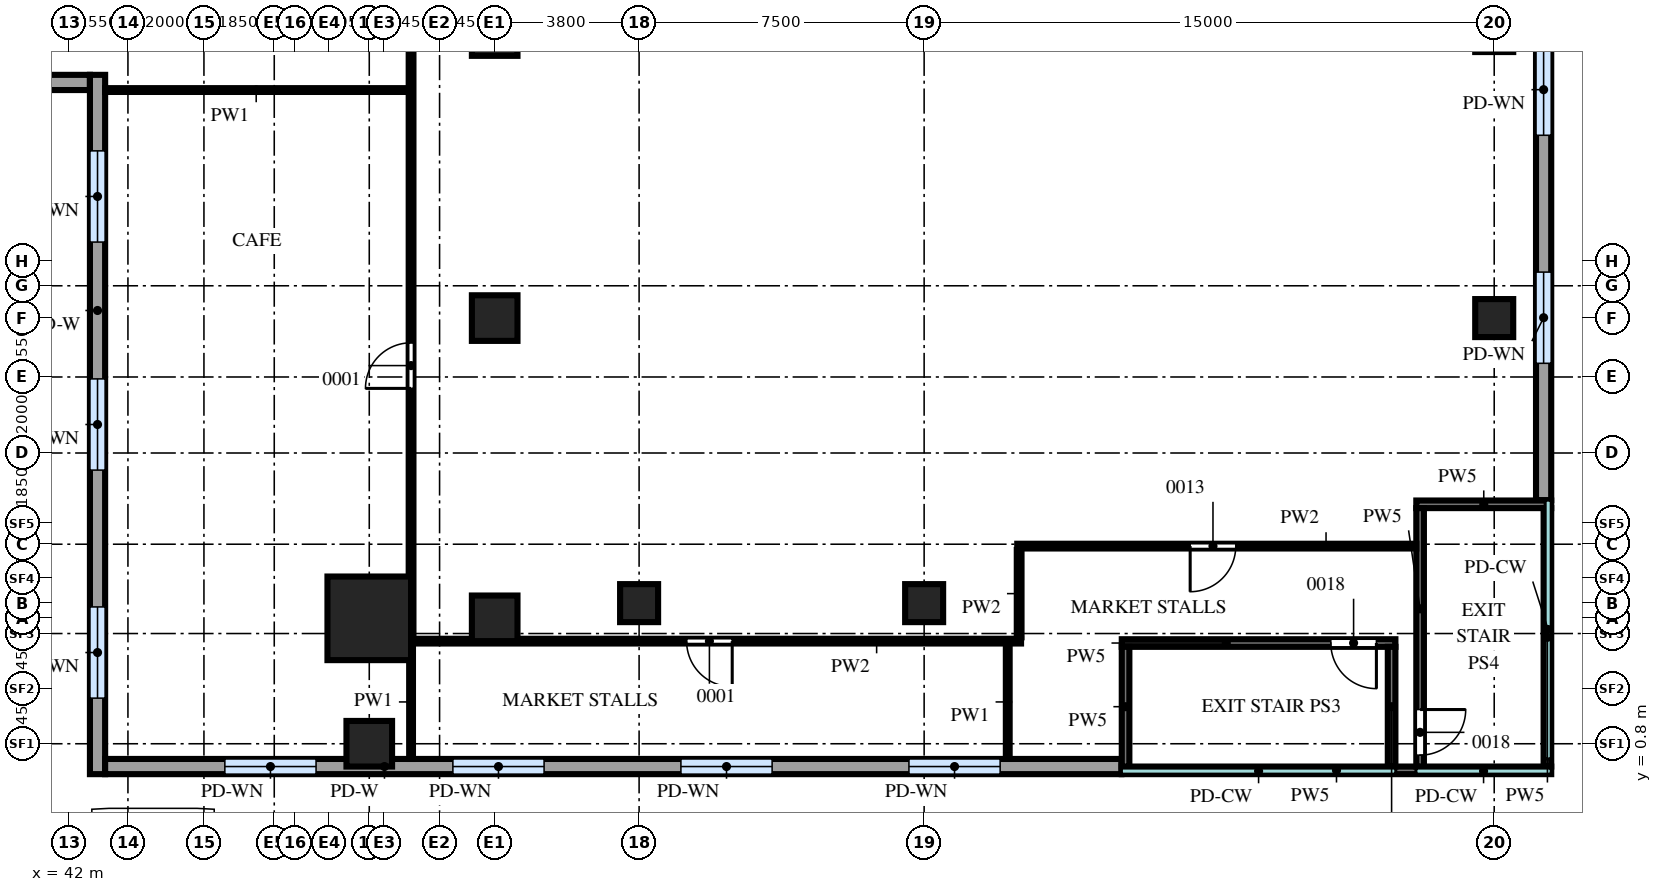
"""IFC4 building model, lengths in metres.
Left out: names, types, materials, properties, quantities, classifications, styles, units other than length and angle.
Written with IfcOpenShell. Run it as: python <this file> out.ifc"""

import sys

from ifc_helpers import new_model, si_unit, direction, frame, frame_2d, origin, origin_2d, place, context, subcontext, project, spatial, rectangle, extrude, source, transform, mapped, element, fill, save


model = new_model("IFC4")
c1 = context("Model", 3, precision=1e-05, world=origin(), true_north=direction((0.0, 1.0)))
c2 = subcontext(c1, "Body", "Model", "MODEL_VIEW")
j1 = project(units=[si_unit("LENGTHUNIT", "METRE"), si_unit("PLANEANGLEUNIT", "RADIAN")], contexts=[c1])
p1 = place(None, origin())
s1 = spatial("IfcSite", under=j1, at=p1, CompositionType="ELEMENT")
p2 = place(p1, origin())
s2 = spatial("IfcBuilding", under=s1, at=p2, CompositionType="ELEMENT")
p3 = place(p2, frame((0.0, 0.0, 7.5)))
s3 = spatial("IfcBuildingStorey", under=s2, at=p3, CompositionType="ELEMENT", Elevation=7.5)
m1 = source(origin(), c2, "Body", "SweptSolid", [
    extrude(rectangle(XDim=2.2, YDim=2.2, at=origin_2d()), origin(), (0.0, 0.0, 1.0), 5.2),
])
p4 = place(p3, frame((49.9, 4.1, 0.0), z_axis=(0.0, 0.0, 1.0), x_axis=(1.0, 0.0, 0.0)))
e1 = element("IfcColumn", 1, at=p4, inside=s3, PredefinedType="COLUMN", context=c2, shape_type="MappedRepresentation", body=[
    mapped(m1, transform((0.0, 0.0, 0.0))),
])
m2 = source(origin(), c2, "Body", "SweptSolid", [
    extrude(rectangle(XDim=1.2, YDim=1.2, at=origin_2d()), origin(), (0.0, 0.0, 1.0), 5.2),
])
for number, where, z_axis, x_axis in (
    (2, (49.9, 0.8, 0.0), (0.0, 0.0, 1.0), (1.0, 0.0, 0.0)),
    (3, (53.2, 4.1, 0.0), (0.0, 0.0, 1.0), (1.0, 0.0, 0.0)),
    (4, (53.2, 12.0, 0.0), (0.0, 0.0, 1.0), (1.0, 0.0, 0.0)),
    (5, (53.2, 19.5, 0.0), (0.0, 0.0, 1.0), (1.0, 0.0, 0.0)),
):
    element("IfcColumn", number, at=place(p3, frame(where, z_axis=z_axis, x_axis=x_axis)), inside=s3, PredefinedType="COLUMN", context=c2, shape_type="MappedRepresentation", body=[
        mapped(m2, transform((0.0, 0.0, 0.0))),
    ])
m3 = source(origin(), c2, "Body", "SweptSolid", [
    extrude(rectangle(XDim=1.0, YDim=1.0, at=origin_2d()), origin(), (0.0, 0.0, 1.0), 5.2),
])
for number, where, z_axis, x_axis in (
    (6, (57.0, 4.5, 0.0), (0.0, 0.0, 1.0), (1.0, 0.0, 0.0)),
    (7, (64.5, 4.5, 0.0), (0.0, 0.0, 1.0), (1.0, 0.0, 0.0)),
    (8, (79.5, 12.0, 0.0), (0.0, 0.0, 1.0), (1.0, 0.0, 0.0)),
):
    element("IfcColumn", number, at=place(p3, frame(where, z_axis=z_axis, x_axis=x_axis)), inside=s3, PredefinedType="COLUMN", context=c2, shape_type="MappedRepresentation", body=[
        mapped(m3, transform((0.0, 0.0, 0.0))),
    ])
m4 = source(origin(), c2, "Body", "SweptSolid", [
    extrude(rectangle(XDim=13.5, YDim=0.4, at=frame_2d((6.75, 0.0))), origin(), (0.0, 0.0, 1.0), 5.2),
])
p5 = place(p3, frame((29.05, 18.2, 0.0), z_axis=(0.0, 0.0, 1.0), x_axis=(1.0, 0.0, 0.0)))
e9 = element("IfcWall", 9, at=p5, inside=s3, PredefinedType="SOLIDWALL", context=c2, shape_type="MappedRepresentation", body=[
    mapped(m4, transform((0.0, 0.0, 0.0))),
])
m5 = source(origin(), c2, "Body", "SweptSolid", [
    extrude(rectangle(XDim=2.4, YDim=2.4, at=frame_2d((1.2, 1.2))), frame((0.0, 0.21, 0.0), z_axis=(0.0, -1.0, 0.0), x_axis=(1.0, 0.0, 0.0)), (0.0, 0.0, 1.0), 0.42),
])
p6 = place(p5, frame((2.55, 0.0, 1.0)))
e10 = element("IfcOpeningElement", 10, at=p6, cuts=e9, PredefinedType="OPENING", context=c2, shape_type="MappedRepresentation", body=[
    mapped(m5, transform((0.0, 0.0, 0.0))),
])
p7 = place(p5, frame((8.55, 0.0, 1.0)))
e11 = element("IfcOpeningElement", 11, at=p7, cuts=e9, PredefinedType="OPENING", context=c2, shape_type="MappedRepresentation", body=[
    mapped(m5, transform((0.0, 0.0, 0.0))),
])
m6 = source(origin(), c2, "Body", "SweptSolid", [
    extrude(rectangle(XDim=18.4, YDim=0.4, at=frame_2d((9.2, 0.0))), origin(), (0.0, 0.0, 1.0), 5.2),
])
p8 = place(p3, frame((42.75, 18.4, 0.0), z_axis=(0.0, 0.0, 1.0), x_axis=(0.0, -1.0, 0.0)))
e12 = element("IfcWall", 12, at=p8, inside=s3, PredefinedType="SOLIDWALL", context=c2, shape_type="MappedRepresentation", body=[
    mapped(m6, transform((0.0, 0.0, 0.0))),
])
p9 = place(p8, frame((2.0, 0.0, 1.0)))
e13 = element("IfcOpeningElement", 13, at=p9, cuts=e12, PredefinedType="OPENING", context=c2, shape_type="MappedRepresentation", body=[
    mapped(m5, transform((0.0, 0.0, 0.0))),
])
p10 = place(p8, frame((8.0, 0.0, 1.0)))
e14 = element("IfcOpeningElement", 14, at=p10, cuts=e12, PredefinedType="OPENING", context=c2, shape_type="MappedRepresentation", body=[
    mapped(m5, transform((0.0, 0.0, 0.0))),
])
p11 = place(p8, frame((14.0, 0.0, 1.0)))
e15 = element("IfcOpeningElement", 15, at=p11, cuts=e12, PredefinedType="OPENING", context=c2, shape_type="MappedRepresentation", body=[
    mapped(m5, transform((0.0, 0.0, 0.0))),
])
m7 = source(origin(), c2, "Body", "SweptSolid", [
    extrude(rectangle(XDim=26.74, YDim=0.4, at=frame_2d((13.37, 0.0))), origin(), (0.0, 0.0, 1.0), 5.2),
])
p12 = place(p3, frame((42.95, 0.2, 0.0), z_axis=(0.0, 0.0, 1.0), x_axis=(1.0, 0.0, 0.0)))
e16 = element("IfcWall", 16, at=p12, inside=s3, PredefinedType="SOLIDWALL", context=c2, shape_type="MappedRepresentation", body=[
    mapped(m7, transform((0.0, 0.0, 0.0))),
])
p13 = place(p12, frame((3.15, 0.0, 1.0)))
e17 = element("IfcOpeningElement", 17, at=p13, cuts=e16, PredefinedType="OPENING", context=c2, shape_type="MappedRepresentation", body=[
    mapped(m5, transform((0.0, 0.0, 0.0))),
])
p14 = place(p12, frame((9.15, 0.0, 1.0)))
e18 = element("IfcOpeningElement", 18, at=p14, cuts=e16, PredefinedType="OPENING", context=c2, shape_type="MappedRepresentation", body=[
    mapped(m5, transform((0.0, 0.0, 0.0))),
])
p15 = place(p12, frame((15.15, 0.0, 1.0)))
e19 = element("IfcOpeningElement", 19, at=p15, cuts=e16, PredefinedType="OPENING", context=c2, shape_type="MappedRepresentation", body=[
    mapped(m5, transform((0.0, 0.0, 0.0))),
])
p16 = place(p12, frame((21.15, 0.0, 1.0)))
e20 = element("IfcOpeningElement", 20, at=p16, cuts=e16, PredefinedType="OPENING", context=c2, shape_type="MappedRepresentation", body=[
    mapped(m5, transform((0.0, 0.0, 0.0))),
])
m8 = source(origin(), c2, "Body", "SweptSolid", [
    extrude(rectangle(XDim=39.58, YDim=0.4, at=frame_2d((19.79, 0.0))), origin(), (0.0, 0.0, 1.0), 5.2),
])
p17 = place(p3, frame((80.8, 7.21, 0.0), z_axis=(0.0, 0.0, 1.0), x_axis=(0.0, 1.0, 0.0)))
e21 = element("IfcWall", 21, at=p17, inside=s3, PredefinedType="SOLIDWALL", context=c2, shape_type="MappedRepresentation", body=[
    mapped(m8, transform((0.0, 0.0, 0.0))),
])
p18 = place(p17, frame((3.6, 0.0, 1.0)))
e22 = element("IfcOpeningElement", 22, at=p18, cuts=e21, PredefinedType="OPENING", context=c2, shape_type="MappedRepresentation", body=[
    mapped(m5, transform((0.0, 0.0, 0.0))),
])
p19 = place(p17, frame((9.6, 0.0, 1.0)))
e23 = element("IfcOpeningElement", 23, at=p19, cuts=e21, PredefinedType="OPENING", context=c2, shape_type="MappedRepresentation", body=[
    mapped(m5, transform((0.0, 0.0, 0.0))),
])
p20 = place(p17, frame((15.6, 0.0, 1.0)))
e24 = element("IfcOpeningElement", 24, at=p20, cuts=e21, PredefinedType="OPENING", context=c2, shape_type="MappedRepresentation", body=[
    mapped(m5, transform((0.0, 0.0, 0.0))),
])
p21 = place(p17, frame((21.6, 0.0, 1.0)))
e25 = element("IfcOpeningElement", 25, at=p21, cuts=e21, PredefinedType="OPENING", context=c2, shape_type="MappedRepresentation", body=[
    mapped(m5, transform((0.0, 0.0, 0.0))),
])
p22 = place(p17, frame((27.6, 0.0, 1.0)))
e26 = element("IfcOpeningElement", 26, at=p22, cuts=e21, PredefinedType="OPENING", context=c2, shape_type="MappedRepresentation", body=[
    mapped(m5, transform((0.0, 0.0, 0.0))),
])
p23 = place(p17, frame((33.6, 0.0, 1.0)))
e27 = element("IfcOpeningElement", 27, at=p23, cuts=e21, PredefinedType="OPENING", context=c2, shape_type="MappedRepresentation", body=[
    mapped(m5, transform((0.0, 0.0, 0.0))),
])
m9 = source(origin(), c2, "Body", "SweptSolid", [
    extrude(rectangle(XDim=11.3, YDim=0.2, at=frame_2d((5.65, 0.0))), origin(), (0.0, 0.0, 1.0), 5.2),
])
p24 = place(p3, frame((69.7, 0.1, 0.0), z_axis=(0.0, 0.0, 1.0), x_axis=(1.0, 0.0, 0.0)))
e28 = element("IfcWall", 28, at=p24, inside=s3, PredefinedType="PARTITIONING", context=c2, shape_type="MappedRepresentation", body=[
    mapped(m9, transform((0.0, 0.0, 0.0))),
])
m10 = source(origin(), c2, "Body", "SweptSolid", [
    extrude(rectangle(XDim=7.2, YDim=0.2, at=frame_2d((3.6, 0.0))), origin(), (0.0, 0.0, 1.0), 5.2),
])
p25 = place(p3, frame((69.7, 3.45, 0.0), z_axis=(0.0, 0.0, 1.0), x_axis=(1.0, 0.0, 0.0)))
e29 = element("IfcWall", 29, at=p25, inside=s3, PredefinedType="PARTITIONING", context=c2, shape_type="MappedRepresentation", body=[
    mapped(m10, transform((0.0, 0.0, 0.0))),
])
m11 = source(origin(), c2, "Body", "SweptSolid", [
    extrude(rectangle(XDim=1.2, YDim=2.1, at=frame_2d((0.6, 1.05))), frame((0.0, 0.11, 0.0), z_axis=(0.0, -1.0, 0.0), x_axis=(1.0, 0.0, 0.0)), (0.0, 0.0, 1.0), 0.22),
])
p26 = place(p25, frame((5.5, 0.0, 0.0)))
e30 = element("IfcOpeningElement", 30, at=p26, cuts=e29, PredefinedType="OPENING", context=c2, shape_type="MappedRepresentation", body=[
    mapped(m11, transform((0.0, 0.0, 0.0))),
])
m12 = source(origin(), c2, "Body", "SweptSolid", [
    extrude(rectangle(XDim=3.15, YDim=0.2, at=frame_2d((1.575, 0.0))), origin(), (0.0, 0.0, 1.0), 5.2),
])
for number, where, z_axis, x_axis in (
    (31, (69.8, 0.2, 0.0), (0.0, 0.0, 1.0), (0.0, 1.0, 0.0)),
    (32, (76.8, 0.2, 0.0), (0.0, 0.0, 1.0), (0.0, 1.0, 0.0)),
):
    element("IfcWall", number, at=place(p3, frame(where, z_axis=z_axis, x_axis=x_axis)), inside=s3, PredefinedType="PARTITIONING", context=c2, shape_type="MappedRepresentation", body=[
        mapped(m12, transform((0.0, 0.0, 0.0))),
    ])
m13 = source(origin(), c2, "Body", "SweptSolid", [
    extrude(rectangle(XDim=3.55, YDim=0.2, at=frame_2d((1.775, 0.0))), origin(), (0.0, 0.0, 1.0), 5.2),
])
p27 = place(p3, frame((77.45, 7.1, 0.0), z_axis=(0.0, 0.0, 1.0), x_axis=(1.0, 0.0, 0.0)))
e33 = element("IfcWall", 33, at=p27, inside=s3, PredefinedType="PARTITIONING", context=c2, shape_type="MappedRepresentation", body=[
    mapped(m13, transform((0.0, 0.0, 0.0))),
])
m14 = source(origin(), c2, "Body", "SweptSolid", [
    extrude(rectangle(XDim=6.8, YDim=0.2, at=frame_2d((3.4, 0.0))), origin(), (0.0, 0.0, 1.0), 5.2),
])
p28 = place(p3, frame((77.55, 0.2, 0.0), z_axis=(0.0, 0.0, 1.0), x_axis=(0.0, 1.0, 0.0)))
e34 = element("IfcWall", 34, at=p28, inside=s3, PredefinedType="PARTITIONING", context=c2, shape_type="MappedRepresentation", body=[
    mapped(m14, transform((0.0, 0.0, 0.0))),
])
p29 = place(p28, frame((0.3, 0.0, 0.0)))
e35 = element("IfcOpeningElement", 35, at=p29, cuts=e34, PredefinedType="OPENING", context=c2, shape_type="MappedRepresentation", body=[
    mapped(m11, transform((0.0, 0.0, 0.0))),
])
p30 = place(p3, frame((80.9, 0.2, 0.0), z_axis=(0.0, 0.0, 1.0), x_axis=(0.0, 1.0, 0.0)))
e36 = element("IfcWall", 36, at=p30, inside=s3, PredefinedType="PARTITIONING", context=c2, shape_type="MappedRepresentation", body=[
    mapped(m14, transform((0.0, 0.0, 0.0))),
])
m15 = source(origin(), c2, "Body", "SweptSolid", [
    extrude(rectangle(XDim=3.0, YDim=0.1, at=frame_2d((1.5, 0.0))), origin(), (0.0, 0.0, 1.0), 5.2),
])
for number, where, z_axis, x_axis in (
    (37, (51.0, 0.4, 0.0), (0.0, 0.0, 1.0), (0.0, 1.0, 0.0)),
    (38, (66.7, 0.4, 0.0), (0.0, 0.0, 1.0), (0.0, 1.0, 0.0)),
):
    element("IfcWall", number, at=place(p3, frame(where, z_axis=z_axis, x_axis=x_axis)), inside=s3, PredefinedType="PARTITIONING", context=c2, shape_type="MappedRepresentation", body=[
        mapped(m15, transform((0.0, 0.0, 0.0))),
    ])
m16 = source(origin(), c2, "Body", "SweptSolid", [
    extrude(rectangle(XDim=16.1, YDim=0.125, at=frame_2d((8.05, 0.0))), origin(), (0.0, 0.0, 1.0), 5.2),
])
p31 = place(p3, frame((50.95, 3.5, 0.0), z_axis=(0.0, 0.0, 1.0), x_axis=(1.0, 0.0, 0.0)))
e39 = element("IfcWall", 39, at=p31, inside=s3, PredefinedType="PARTITIONING", context=c2, shape_type="MappedRepresentation", body=[
    mapped(m16, transform((0.0, 0.0, 0.0))),
])
m17 = source(origin(), c2, "Body", "SweptSolid", [
    extrude(rectangle(XDim=1.2, YDim=2.1, at=frame_2d((0.6, 1.05))), frame((0.0, 0.073, 0.0), z_axis=(0.0, -1.0, 0.0), x_axis=(1.0, 0.0, 0.0)), (0.0, 0.0, 1.0), 0.145),
])
p32 = place(p31, frame((7.3, 0.0, 0.0)))
e40 = element("IfcOpeningElement", 40, at=p32, cuts=e39, PredefinedType="OPENING", context=c2, shape_type="MappedRepresentation", body=[
    mapped(m17, transform((0.0, 0.0, 0.0))),
])
m18 = source(origin(), c2, "Body", "SweptSolid", [
    extrude(rectangle(XDim=29.7, YDim=0.125, at=frame_2d((14.85, 0.0))), origin(), (0.0, 0.0, 1.0), 5.2),
])
p33 = place(p3, frame((51.0, 3.6, 0.0), z_axis=(0.0, 0.0, 1.0), x_axis=(0.0, 1.0, 0.0)))
e41 = element("IfcWall", 41, at=p33, inside=s3, PredefinedType="PARTITIONING", context=c2, shape_type="MappedRepresentation", body=[
    mapped(m18, transform((0.0, 0.0, 0.0))),
])
p34 = place(p33, frame((6.55, 0.0, 0.0)))
e42 = element("IfcOpeningElement", 42, at=p34, cuts=e41, PredefinedType="OPENING", context=c2, shape_type="MappedRepresentation", body=[
    mapped(m17, transform((0.0, 0.0, 0.0))),
])
m19 = source(origin(), c2, "Body", "SweptSolid", [
    extrude(rectangle(XDim=2.3, YDim=0.125, at=frame_2d((1.15, 0.0))), origin(), (0.0, 0.0, 1.0), 5.2),
])
p35 = place(p3, frame((67.0, 3.6, 0.0), z_axis=(0.0, 0.0, 1.0), x_axis=(0.0, 1.0, 0.0)))
e43 = element("IfcWall", 43, at=p35, inside=s3, PredefinedType="PARTITIONING", context=c2, shape_type="MappedRepresentation", body=[
    mapped(m19, transform((0.0, 0.0, 0.0))),
])
m20 = source(origin(), c2, "Body", "SweptSolid", [
    extrude(rectangle(XDim=10.5, YDim=0.125, at=frame_2d((5.25, 0.0))), origin(), (0.0, 0.0, 1.0), 5.2),
])
p36 = place(p3, frame((66.95, 6.0, 0.0), z_axis=(0.0, 0.0, 1.0), x_axis=(1.0, 0.0, 0.0)))
e44 = element("IfcWall", 44, at=p36, inside=s3, PredefinedType="PARTITIONING", context=c2, shape_type="MappedRepresentation", body=[
    mapped(m20, transform((0.0, 0.0, 0.0))),
])
p37 = place(p36, frame((4.55, 0.0, 0.0)))
e45 = element("IfcOpeningElement", 45, at=p37, cuts=e44, PredefinedType="OPENING", context=c2, shape_type="MappedRepresentation", body=[
    mapped(m17, transform((0.0, 0.0, 0.0))),
])
m21 = source(origin(), c2, "Body", "SweptSolid", [
    extrude(rectangle(XDim=7.95, YDim=0.1, at=frame_2d((3.975, 0.0))), origin(), (0.0, 0.0, 1.0), 5.2),
])
p38 = place(p3, frame((42.95, 18.0, 0.0), z_axis=(0.0, 0.0, 1.0), x_axis=(1.0, 0.0, 0.0)))
e46 = element("IfcWall", 46, at=p38, inside=s3, PredefinedType="PARTITIONING", context=c2, shape_type="MappedRepresentation", body=[
    mapped(m21, transform((0.0, 0.0, 0.0))),
])
m22 = source(origin(), c2, "Body", "SweptSolid", [
    extrude(rectangle(XDim=2.4, YDim=2.4, at=frame_2d((1.2, 1.2))), frame((0.0, 0.03, 0.0), z_axis=(0.0, -1.0, 0.0), x_axis=(1.0, 0.0, 0.0)), (0.0, 0.0, 1.0), 0.06),
])
p39 = place(p9, origin())
e47 = element("IfcWindow", 47, at=p39, inside=s3, PartitioningType="SINGLE_PANEL", PredefinedType="WINDOW", context=c2, shape_type="MappedRepresentation", body=[
    mapped(m22, transform((0.0, 0.0, 0.0))),
])
fill(e13, e47)
p40 = place(p10, origin())
e48 = element("IfcWindow", 48, at=p40, inside=s3, PartitioningType="SINGLE_PANEL", PredefinedType="WINDOW", context=c2, shape_type="MappedRepresentation", body=[
    mapped(m22, transform((0.0, 0.0, 0.0))),
])
fill(e14, e48)
p41 = place(p11, origin())
e49 = element("IfcWindow", 49, at=p41, inside=s3, PartitioningType="SINGLE_PANEL", PredefinedType="WINDOW", context=c2, shape_type="MappedRepresentation", body=[
    mapped(m22, transform((0.0, 0.0, 0.0))),
])
fill(e15, e49)
p42 = place(p13, origin())
e50 = element("IfcWindow", 50, at=p42, inside=s3, PartitioningType="SINGLE_PANEL", PredefinedType="WINDOW", context=c2, shape_type="MappedRepresentation", body=[
    mapped(m22, transform((0.0, 0.0, 0.0))),
])
fill(e17, e50)
p43 = place(p14, origin())
e51 = element("IfcWindow", 51, at=p43, inside=s3, PartitioningType="SINGLE_PANEL", PredefinedType="WINDOW", context=c2, shape_type="MappedRepresentation", body=[
    mapped(m22, transform((0.0, 0.0, 0.0))),
])
fill(e18, e51)
p44 = place(p15, origin())
e52 = element("IfcWindow", 52, at=p44, inside=s3, PartitioningType="SINGLE_PANEL", PredefinedType="WINDOW", context=c2, shape_type="MappedRepresentation", body=[
    mapped(m22, transform((0.0, 0.0, 0.0))),
])
fill(e19, e52)
p45 = place(p16, origin())
e53 = element("IfcWindow", 53, at=p45, inside=s3, PartitioningType="SINGLE_PANEL", PredefinedType="WINDOW", context=c2, shape_type="MappedRepresentation", body=[
    mapped(m22, transform((0.0, 0.0, 0.0))),
])
fill(e20, e53)
p46 = place(p18, origin())
e54 = element("IfcWindow", 54, at=p46, inside=s3, PartitioningType="SINGLE_PANEL", PredefinedType="WINDOW", context=c2, shape_type="MappedRepresentation", body=[
    mapped(m22, transform((0.0, 0.0, 0.0))),
])
fill(e22, e54)
p47 = place(p19, origin())
e55 = element("IfcWindow", 55, at=p47, inside=s3, PartitioningType="SINGLE_PANEL", PredefinedType="WINDOW", context=c2, shape_type="MappedRepresentation", body=[
    mapped(m22, transform((0.0, 0.0, 0.0))),
])
fill(e23, e55)
m23 = source(origin(), c2, "Body", "SweptSolid", [
    extrude(rectangle(XDim=1.2, YDim=2.1, at=frame_2d((0.6, 1.05))), frame((0.0, 0.025, 0.0), z_axis=(0.0, -1.0, 0.0), x_axis=(1.0, 0.0, 0.0)), (0.0, 0.0, 1.0), 0.05),
])
p48 = place(p34, origin())
e56 = element("IfcDoor", 56, at=p48, inside=s3, OperationType="SINGLE_SWING_RIGHT", PredefinedType="DOOR", context=c2, shape_type="MappedRepresentation", body=[
    mapped(m23, transform((0.0, 0.0, 0.0))),
])
fill(e42, e56)
p49 = place(p32, origin())
e57 = element("IfcDoor", 57, at=p49, inside=s3, OperationType="SINGLE_SWING_RIGHT", PredefinedType="DOOR", context=c2, shape_type="MappedRepresentation", body=[
    mapped(m23, transform((0.0, 0.0, 0.0))),
])
fill(e40, e57)
p50 = place(p37, origin())
e58 = element("IfcDoor", 58, at=p50, inside=s3, OperationType="SINGLE_SWING_LEFT", PredefinedType="DOOR", context=c2, shape_type="MappedRepresentation", body=[
    mapped(m23, transform((0.0, 0.0, 0.0))),
])
fill(e45, e58)
p51 = place(p26, origin())
e59 = element("IfcDoor", 59, at=p51, inside=s3, OperationType="SINGLE_SWING_RIGHT", PredefinedType="DOOR", context=c2, shape_type="MappedRepresentation", body=[
    mapped(m23, transform((0.0, 0.0, 0.0))),
])
fill(e30, e59)
p52 = place(p29, origin())
e60 = element("IfcDoor", 60, at=p52, inside=s3, OperationType="SINGLE_SWING_RIGHT", PredefinedType="DOOR", context=c2, shape_type="MappedRepresentation", body=[
    mapped(m23, transform((0.0, 0.0, 0.0))),
])
fill(e35, e60)
save(model, sys.argv[1])
